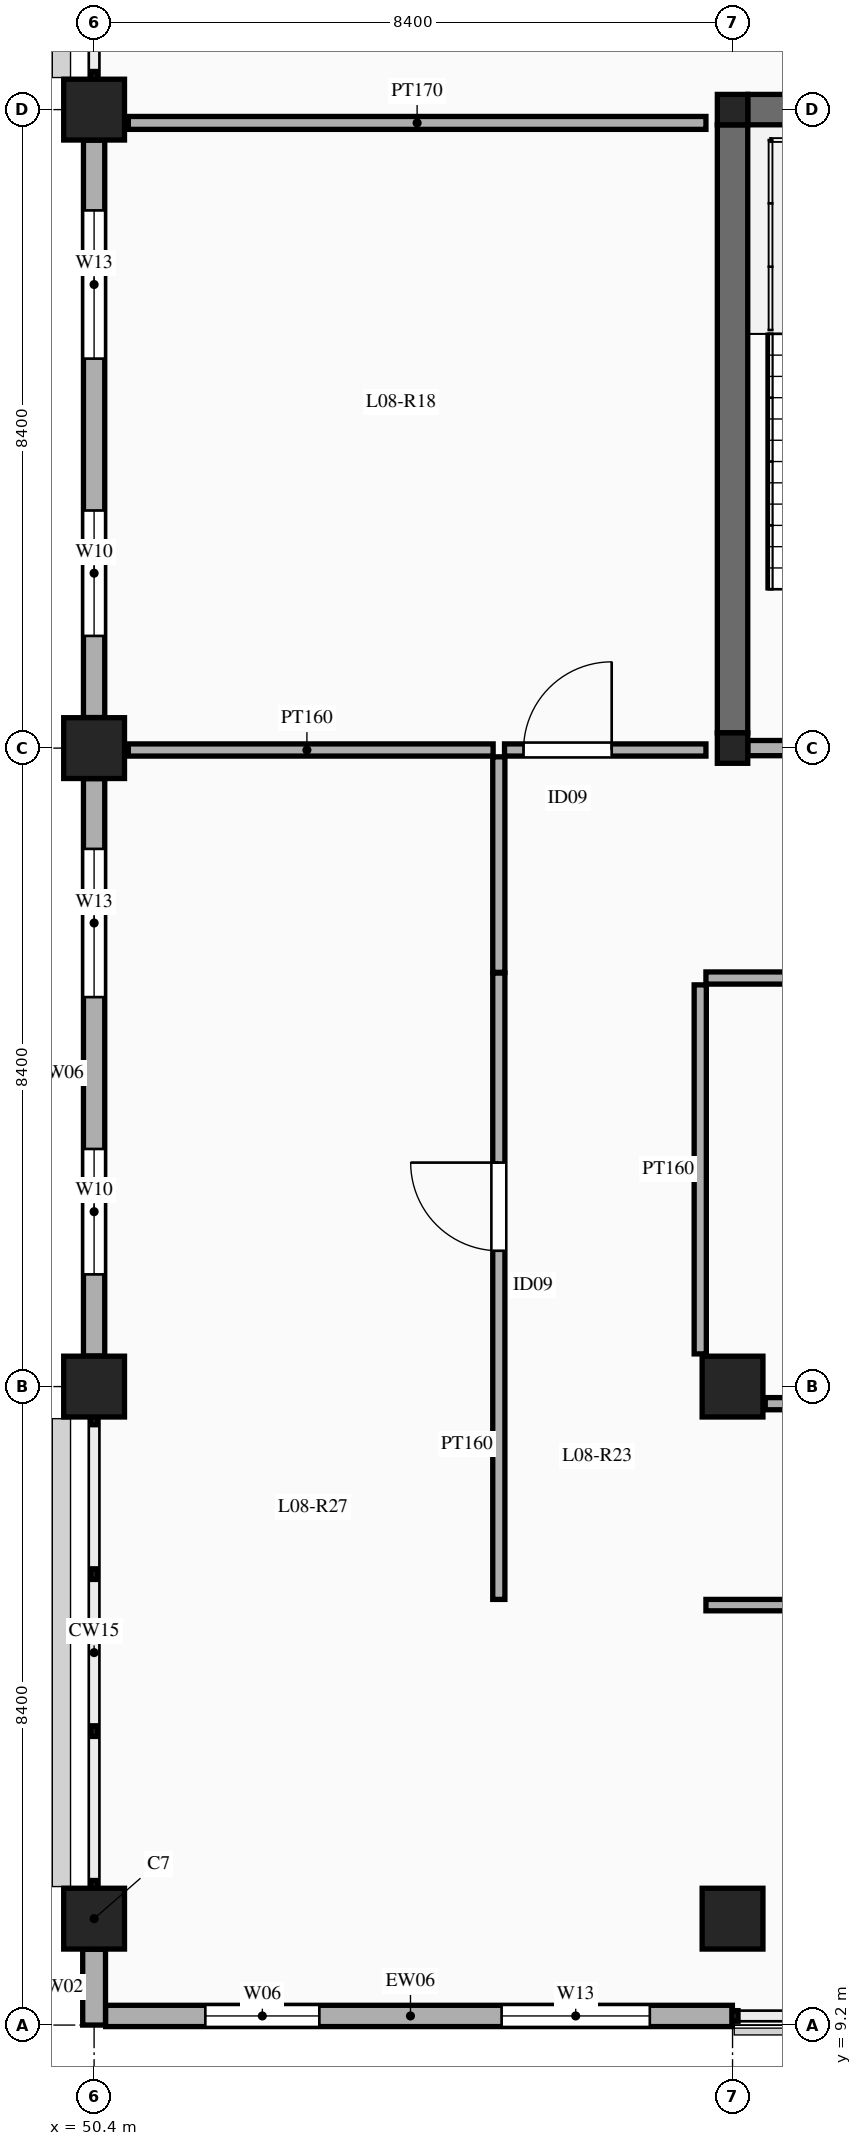
"""IFC4 building model, lengths in metres.
Left out: names, types, materials, properties, quantities, classifications, styles, units other than length and angle.
Written with IfcOpenShell. Run it as: python <this file> out.ifc"""

import sys

from ifc_helpers import new_model, si_unit, direction, frame, frame_2d, origin, origin_2d, place, context, subcontext, project, spatial, rectangle, extrude, element, fill, save


model = new_model("IFC4")
c1 = context("Model", 3, precision=1e-05, world=origin(), true_north=direction((0.0, 1.0)))
c2 = subcontext(c1, "Body", "Model", "MODEL_VIEW")
j1 = project(units=[si_unit("LENGTHUNIT", "METRE"), si_unit("PLANEANGLEUNIT", "RADIAN")], contexts=[c1])
p1 = place(None, origin())
s1 = spatial("IfcSite", under=j1, at=p1, CompositionType="ELEMENT")
p2 = place(p1, origin())
s2 = spatial("IfcBuilding", under=s1, at=p2, CompositionType="ELEMENT")
p3 = place(p2, frame((0.0, 0.0, 37.5)))
s3 = spatial("IfcBuildingStorey", under=s2, at=p3, CompositionType="ELEMENT", Elevation=37.5)
for number, where, z_axis, x_axis in (
    (1, (50.4, 10.6, 0.0), (0.0, 0.0, 1.0), (1.0, 0.0, 0.0)),
    (2, (50.4, 17.6, 0.0), (0.0, 0.0, 1.0), (1.0, 0.0, 0.0)),
    (3, (50.4, 26.0, 0.0), (0.0, 0.0, 1.0), (1.0, 0.0, 0.0)),
    (4, (50.4, 34.4, 0.0), (0.0, 0.0, 1.0), (1.0, 0.0, 0.0)),
    (5, (58.8, 10.6, 0.0), (0.0, 0.0, 1.0), (1.0, 0.0, 0.0)),
    (6, (58.8, 17.6, 0.0), (0.0, 0.0, 1.0), (1.0, 0.0, 0.0)),
):
    element("IfcColumn", number, at=place(p3, frame(where, z_axis=z_axis, x_axis=x_axis)), inside=s3, PredefinedType="COLUMN", context=c2, shape_type="SweptSolid", body=[
        extrude(rectangle(XDim=0.8, YDim=0.8, at=origin_2d()), origin(), (0.0, 0.0, 1.0), 4.5),
    ])
for number, where, z_axis, x_axis in (
    (7, (58.8, 26.0, 0.0), (0.0, 0.0, 1.0), (1.0, 0.0, 0.0)),
    (8, (58.8, 34.4, 0.0), (0.0, 0.0, 1.0), (1.0, 0.0, 0.0)),
):
    element("IfcColumn", number, at=place(p3, frame(where, z_axis=z_axis, x_axis=x_axis)), inside=s3, PredefinedType="COLUMN", context=c2, shape_type="SweptSolid", body=[
        extrude(rectangle(XDim=0.4, YDim=0.4, at=origin_2d()), origin(), (0.0, 0.0, 1.0), 4.5),
    ])
for number, where, z_axis, x_axis in (
    (9, (58.8, 26.2, 0.0), (0.0, 0.0, 1.0), (0.0, 1.0, 0.0)),
    (10, (59.0, 34.4, 0.0), (0.0, 0.0, 1.0), (1.0, 0.0, 0.0)),
):
    element("IfcWall", number, at=place(p3, frame(where, z_axis=z_axis, x_axis=x_axis)), inside=s3, PredefinedType="SHEAR", context=c2, shape_type="SweptSolid", body=[
        extrude(rectangle(XDim=8.0, YDim=0.4, at=frame_2d((4.0, 0.0))), origin(), (0.0, 0.0, 1.0), 4.5),
    ])
p4 = place(p3, frame((50.4, 9.2, 0.0), z_axis=(0.0, 0.0, 1.0), x_axis=(0.0, 1.0, 0.0)))
e11 = element("IfcWall", 11, at=p4, inside=s3, PredefinedType="SOLIDWALL", context=c2, shape_type="SweptSolid", body=[
    extrude(rectangle(XDim=0.998, YDim=0.3, at=frame_2d((0.499, 0.0))), origin(), (0.0, 0.0, 1.0), 3.55),
])
p5 = place(p3, frame((50.552, 9.32, 0.0), z_axis=(0.0, 0.0, 1.0), x_axis=(1.0, 0.0, 0.0)))
e12 = element("IfcWall", 12, at=p5, inside=s3, PredefinedType="ELEMENTEDWALL", context=c2, shape_type="SweptSolid", body=[
    extrude(rectangle(XDim=8.246, YDim=0.28, at=frame_2d((4.123, 0.0))), origin(), (0.0, 0.0, 1.0), 3.55),
])
p6 = place(p5, frame((1.312, 0.0, 0.9)))
e13 = element("IfcOpeningElement", 13, at=p6, cuts=e12, PredefinedType="OPENING", context=c2, shape_type="SweptSolid", body=[
    extrude(rectangle(XDim=1.5, YDim=2.0, at=frame_2d((0.75, 1.0))), frame((0.0, 0.15, 0.0), z_axis=(0.0, -1.0, 0.0), x_axis=(1.0, 0.0, 0.0)), (0.0, 0.0, 1.0), 0.3),
])
p7 = place(p5, frame((5.209, 0.0, 0.9)))
e14 = element("IfcOpeningElement", 14, at=p7, cuts=e12, PredefinedType="OPENING", context=c2, shape_type="SweptSolid", body=[
    extrude(rectangle(XDim=1.95, YDim=2.0, at=frame_2d((0.975, 1.0))), frame((0.0, 0.15, 0.0), z_axis=(0.0, -1.0, 0.0), x_axis=(1.0, 0.0, 0.0)), (0.0, 0.0, 1.0), 0.3),
])
p8 = place(p3, frame((50.4, 18.002, 0.0), z_axis=(0.0, 0.0, 1.0), x_axis=(0.0, 1.0, 0.0)))
e15 = element("IfcWall", 15, at=p8, inside=s3, PredefinedType="ELEMENTEDWALL", context=c2, shape_type="SweptSolid", body=[
    extrude(rectangle(XDim=7.596, YDim=0.28, at=frame_2d((3.798, 0.0))), origin(), (0.0, 0.0, 1.0), 3.55),
])
p9 = place(p8, frame((1.074, 0.0, 0.9)))
e16 = element("IfcOpeningElement", 16, at=p9, cuts=e15, PredefinedType="OPENING", context=c2, shape_type="SweptSolid", body=[
    extrude(rectangle(XDim=1.65, YDim=1.95, at=frame_2d((0.825, 0.975))), frame((0.0, 0.15, 0.0), z_axis=(0.0, -1.0, 0.0), x_axis=(1.0, 0.0, 0.0)), (0.0, 0.0, 1.0), 0.3),
])
p10 = place(p8, frame((4.722, 0.0, 0.9)))
e17 = element("IfcOpeningElement", 17, at=p10, cuts=e15, PredefinedType="OPENING", context=c2, shape_type="SweptSolid", body=[
    extrude(rectangle(XDim=1.95, YDim=2.0, at=frame_2d((0.975, 1.0))), frame((0.0, 0.15, 0.0), z_axis=(0.0, -1.0, 0.0), x_axis=(1.0, 0.0, 0.0)), (0.0, 0.0, 1.0), 0.3),
])
p11 = place(p3, frame((50.4, 26.402, 0.0), z_axis=(0.0, 0.0, 1.0), x_axis=(0.0, 1.0, 0.0)))
e18 = element("IfcWall", 18, at=p11, inside=s3, PredefinedType="ELEMENTEDWALL", context=c2, shape_type="SweptSolid", body=[
    extrude(rectangle(XDim=7.596, YDim=0.28, at=frame_2d((3.798, 0.0))), origin(), (0.0, 0.0, 1.0), 3.55),
])
p12 = place(p11, frame((1.074, 0.0, 0.9)))
e19 = element("IfcOpeningElement", 19, at=p12, cuts=e18, PredefinedType="OPENING", context=c2, shape_type="SweptSolid", body=[
    extrude(rectangle(XDim=1.65, YDim=1.95, at=frame_2d((0.825, 0.975))), frame((0.0, 0.15, 0.0), z_axis=(0.0, -1.0, 0.0), x_axis=(1.0, 0.0, 0.0)), (0.0, 0.0, 1.0), 0.3),
])
p13 = place(p11, frame((4.722, 0.0, 0.9)))
e20 = element("IfcOpeningElement", 20, at=p13, cuts=e18, PredefinedType="OPENING", context=c2, shape_type="SweptSolid", body=[
    extrude(rectangle(XDim=1.95, YDim=2.0, at=frame_2d((0.975, 1.0))), frame((0.0, 0.15, 0.0), z_axis=(0.0, -1.0, 0.0), x_axis=(1.0, 0.0, 0.0)), (0.0, 0.0, 1.0), 0.3),
])
p14 = place(p3, frame((59.0, 26.0, 0.0), z_axis=(0.0, 0.0, 1.0), x_axis=(1.0, 0.0, 0.0)))
e21 = element("IfcWall", 21, at=p14, inside=s3, PredefinedType="SOLIDWALL", context=c2, shape_type="SweptSolid", body=[
    extrude(rectangle(XDim=8.0, YDim=0.2, at=frame_2d((4.0, 0.0))), origin(), (0.0, 0.0, 1.0), 3.78),
])
p15 = place(p14, frame((1.55, 0.0, 0.0)))
e22 = element("IfcOpeningElement", 22, at=p15, cuts=e21, PredefinedType="OPENING", context=c2, shape_type="SweptSolid", body=[
    extrude(rectangle(XDim=1.15, YDim=2.15, at=frame_2d((0.575, 1.075))), frame((0.0, 0.11, 0.0), z_axis=(0.0, -1.0, 0.0), x_axis=(1.0, 0.0, 0.0)), (0.0, 0.0, 1.0), 0.22),
])
p16 = place(p14, frame((5.35, 0.0, 0.0)))
e23 = element("IfcOpeningElement", 23, at=p16, cuts=e21, PredefinedType="OPENING", context=c2, shape_type="SweptSolid", body=[
    extrude(rectangle(XDim=1.22, YDim=2.15, at=frame_2d((0.61, 1.075))), frame((0.0, 0.11, 0.0), z_axis=(0.0, -1.0, 0.0), x_axis=(1.0, 0.0, 0.0)), (0.0, 0.0, 1.0), 0.22),
])
p17 = place(p3, frame((55.8, 25.975, 0.0), z_axis=(0.0, 0.0, 1.0), x_axis=(1.0, 0.0, 0.0)))
e24 = element("IfcWall", 24, at=p17, inside=s3, PredefinedType="PARTITIONING", context=c2, shape_type="SweptSolid", body=[
    extrude(rectangle(XDim=2.65, YDim=0.16, at=frame_2d((1.325, 0.0))), origin(), (0.0, 0.0, 1.0), 3.45),
])
p18 = place(p17, frame((0.25, 0.0, 0.0)))
e25 = element("IfcOpeningElement", 25, at=p18, cuts=e24, PredefinedType="OPENING", context=c2, shape_type="SweptSolid", body=[
    extrude(rectangle(XDim=1.16, YDim=2.2, at=frame_2d((0.58, 1.1))), frame((0.0, 0.09, 0.0), z_axis=(0.0, -1.0, 0.0), x_axis=(1.0, 0.0, 0.0)), (0.0, 0.0, 1.0), 0.18),
])
p19 = place(p3, frame((50.85, 25.975, 0.0), z_axis=(0.0, 0.0, 1.0), x_axis=(1.0, 0.0, 0.0)))
e26 = element("IfcWall", 26, at=p19, inside=s3, PredefinedType="PARTITIONING", context=c2, shape_type="SweptSolid", body=[
    extrude(rectangle(XDim=4.8, YDim=0.16, at=frame_2d((2.4, 0.0))), origin(), (0.0, 0.0, 1.0), 3.45),
])
p20 = place(p3, frame((50.85, 34.225, 0.0), z_axis=(0.0, 0.0, 1.0), x_axis=(1.0, 0.0, 0.0)))
e27 = element("IfcWall", 27, at=p20, inside=s3, PredefinedType="PARTITIONING", context=c2, shape_type="SweptSolid", body=[
    extrude(rectangle(XDim=7.6, YDim=0.17, at=frame_2d((3.8, 0.0))), origin(), (0.0, 0.0, 1.0), 3.45),
])
p21 = place(p3, frame((58.45, 22.975, 0.0), z_axis=(0.0, 0.0, 1.0), x_axis=(1.0, 0.0, 0.0)))
e28 = element("IfcWall", 28, at=p21, inside=s3, PredefinedType="PARTITIONING", context=c2, shape_type="SweptSolid", body=[
    extrude(rectangle(XDim=17.59, YDim=0.16, at=frame_2d((8.795, 0.0))), origin(), (0.0, 0.0, 1.0), 3.45),
])
p22 = place(p21, frame((10.018, 0.0, 0.0)))
e29 = element("IfcOpeningElement", 29, at=p22, cuts=e28, PredefinedType="OPENING", context=c2, shape_type="SweptSolid", body=[
    extrude(rectangle(XDim=1.16, YDim=2.2, at=frame_2d((0.58, 1.1))), frame((0.0, 0.09, 0.0), z_axis=(0.0, -1.0, 0.0), x_axis=(1.0, 0.0, 0.0)), (0.0, 0.0, 1.0), 0.18),
])
p23 = place(p3, frame((55.725, 23.05, 0.0), z_axis=(0.0, 0.0, 1.0), x_axis=(0.0, 1.0, 0.0)))
e30 = element("IfcWall", 30, at=p23, inside=s3, PredefinedType="PARTITIONING", context=c2, shape_type="SweptSolid", body=[
    extrude(rectangle(XDim=2.835, YDim=0.16, at=frame_2d((1.417, 0.0))), origin(), (0.0, 0.0, 1.0), 3.45),
])
p24 = place(p3, frame((58.375, 18.03, 0.0), z_axis=(0.0, 0.0, 1.0), x_axis=(0.0, 1.0, 0.0)))
e31 = element("IfcWall", 31, at=p24, inside=s3, PredefinedType="PARTITIONING", context=c2, shape_type="SweptSolid", body=[
    extrude(rectangle(XDim=4.855, YDim=0.16, at=frame_2d((2.427, 0.0))), origin(), (0.0, 0.0, 1.0), 3.45),
])
p25 = place(p3, frame((55.725, 14.8, 0.0), z_axis=(0.0, 0.0, 1.0), x_axis=(0.0, 1.0, 0.0)))
e32 = element("IfcWall", 32, at=p25, inside=s3, PredefinedType="PARTITIONING", context=c2, shape_type="SweptSolid", body=[
    extrude(rectangle(XDim=8.24, YDim=0.16, at=frame_2d((4.12, 0.0))), origin(), (0.0, 0.0, 1.0), 3.45),
])
p26 = place(p25, frame((4.587, 0.0, 0.0)))
e33 = element("IfcOpeningElement", 33, at=p26, cuts=e32, PredefinedType="OPENING", context=c2, shape_type="SweptSolid", body=[
    extrude(rectangle(XDim=1.16, YDim=2.2, at=frame_2d((0.58, 1.1))), frame((0.0, 0.09, 0.0), z_axis=(0.0, -1.0, 0.0), x_axis=(1.0, 0.0, 0.0)), (0.0, 0.0, 1.0), 0.18),
])
p27 = place(p3, frame((59.23, 17.375, 0.0), z_axis=(0.0, 0.0, 1.0), x_axis=(1.0, 0.0, 0.0)))
e34 = element("IfcWall", 34, at=p27, inside=s3, PredefinedType="PARTITIONING", context=c2, shape_type="SweptSolid", body=[
    extrude(rectangle(XDim=7.54, YDim=0.16, at=frame_2d((3.77, 0.0))), origin(), (0.0, 0.0, 1.0), 3.45),
])
p28 = place(p3, frame((58.45, 14.725, 0.0), z_axis=(0.0, 0.0, 1.0), x_axis=(1.0, 0.0, 0.0)))
e35 = element("IfcWall", 35, at=p28, inside=s3, PredefinedType="PARTITIONING", context=c2, shape_type="SweptSolid", body=[
    extrude(rectangle(XDim=11.55, YDim=0.15, at=frame_2d((5.775, 0.0))), origin(), (0.0, 0.0, 1.0), 3.45),
])
p29 = place(p28, frame((5.2, 0.0, 0.0)))
e36 = element("IfcOpeningElement", 36, at=p29, cuts=e35, PredefinedType="OPENING", context=c2, shape_type="SweptSolid", body=[
    extrude(rectangle(XDim=1.0, YDim=2.15, at=frame_2d((0.5, 1.075))), frame((0.0, 0.085, 0.0), z_axis=(0.0, -1.0, 0.0), x_axis=(1.0, 0.0, 0.0)), (0.0, 0.0, 1.0), 0.17),
])
p30 = place(p6, origin())
e37 = element("IfcWindow", 37, at=p30, inside=s3, PartitioningType="DOUBLE_PANEL_VERTICAL", PredefinedType="WINDOW", context=c2, shape_type="SweptSolid", body=[
    extrude(rectangle(XDim=1.5, YDim=2.0, at=frame_2d((0.75, 1.0))), frame((0.0, 0.03, 0.0), z_axis=(0.0, -1.0, 0.0), x_axis=(1.0, 0.0, 0.0)), (0.0, 0.0, 1.0), 0.06),
])
fill(e13, e37)
p31 = place(p7, origin())
e38 = element("IfcWindow", 38, at=p31, inside=s3, PartitioningType="TRIPLE_PANEL_VERTICAL", PredefinedType="WINDOW", context=c2, shape_type="SweptSolid", body=[
    extrude(rectangle(XDim=1.95, YDim=2.0, at=frame_2d((0.975, 1.0))), frame((0.0, 0.03, 0.0), z_axis=(0.0, -1.0, 0.0), x_axis=(1.0, 0.0, 0.0)), (0.0, 0.0, 1.0), 0.06),
])
fill(e14, e38)
p32 = place(p9, origin())
e39 = element("IfcWindow", 39, at=p32, inside=s3, PartitioningType="DOUBLE_PANEL_HORIZONTAL", PredefinedType="WINDOW", context=c2, shape_type="SweptSolid", body=[
    extrude(rectangle(XDim=1.65, YDim=1.95, at=frame_2d((0.825, 0.975))), frame((0.0, 0.03, 0.0), z_axis=(0.0, -1.0, 0.0), x_axis=(1.0, 0.0, 0.0)), (0.0, 0.0, 1.0), 0.06),
])
fill(e16, e39)
p33 = place(p10, origin())
e40 = element("IfcWindow", 40, at=p33, inside=s3, PartitioningType="TRIPLE_PANEL_VERTICAL", PredefinedType="WINDOW", context=c2, shape_type="SweptSolid", body=[
    extrude(rectangle(XDim=1.95, YDim=2.0, at=frame_2d((0.975, 1.0))), frame((0.0, 0.03, 0.0), z_axis=(0.0, -1.0, 0.0), x_axis=(1.0, 0.0, 0.0)), (0.0, 0.0, 1.0), 0.06),
])
fill(e17, e40)
p34 = place(p12, origin())
e41 = element("IfcWindow", 41, at=p34, inside=s3, PartitioningType="DOUBLE_PANEL_HORIZONTAL", PredefinedType="WINDOW", context=c2, shape_type="SweptSolid", body=[
    extrude(rectangle(XDim=1.65, YDim=1.95, at=frame_2d((0.825, 0.975))), frame((0.0, 0.03, 0.0), z_axis=(0.0, -1.0, 0.0), x_axis=(1.0, 0.0, 0.0)), (0.0, 0.0, 1.0), 0.06),
])
fill(e19, e41)
p35 = place(p13, origin())
e42 = element("IfcWindow", 42, at=p35, inside=s3, PartitioningType="TRIPLE_PANEL_VERTICAL", PredefinedType="WINDOW", context=c2, shape_type="SweptSolid", body=[
    extrude(rectangle(XDim=1.95, YDim=2.0, at=frame_2d((0.975, 1.0))), frame((0.0, 0.03, 0.0), z_axis=(0.0, -1.0, 0.0), x_axis=(1.0, 0.0, 0.0)), (0.0, 0.0, 1.0), 0.06),
])
fill(e20, e42)
p36 = place(p18, origin())
e43 = element("IfcDoor", 43, at=p36, inside=s3, OperationType="SINGLE_SWING_RIGHT", PredefinedType="DOOR", context=c2, shape_type="SweptSolid", body=[
    extrude(rectangle(XDim=1.16, YDim=2.2, at=frame_2d((0.58, 1.1))), frame((0.0, 0.025, 0.0), z_axis=(0.0, -1.0, 0.0), x_axis=(1.0, 0.0, 0.0)), (0.0, 0.0, 1.0), 0.05),
])
fill(e25, e43)
p37 = place(p26, origin())
e44 = element("IfcDoor", 44, at=p37, inside=s3, OperationType="SINGLE_SWING_RIGHT", PredefinedType="DOOR", context=c2, shape_type="SweptSolid", body=[
    extrude(rectangle(XDim=1.16, YDim=2.2, at=frame_2d((0.58, 1.1))), frame((0.0, 0.025, 0.0), z_axis=(0.0, -1.0, 0.0), x_axis=(1.0, 0.0, 0.0)), (0.0, 0.0, 1.0), 0.05),
])
fill(e33, e44)
save(model, sys.argv[1])
